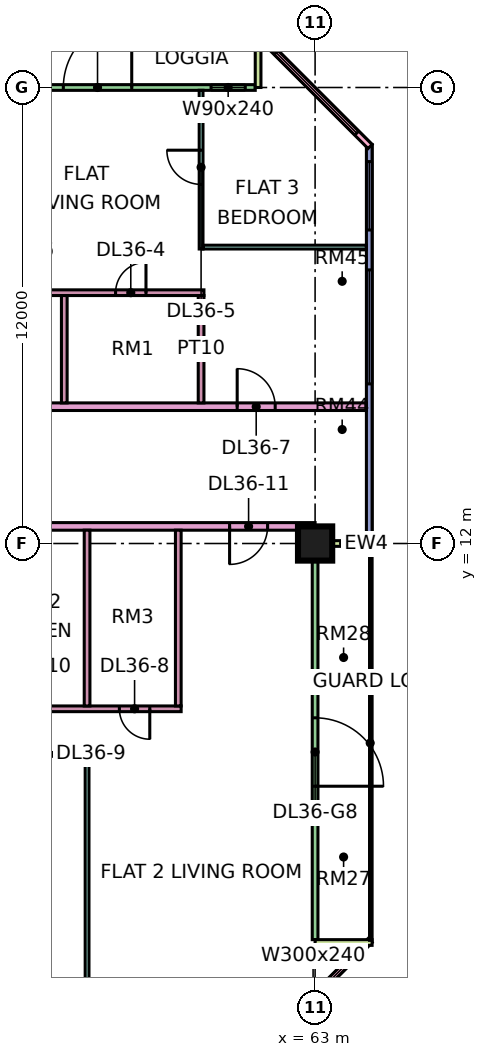
"""IFC4 building model, lengths in metres.
Left out: names, types, materials, properties, quantities, classifications, styles, units other than length and angle.
Written with IfcOpenShell. Run it as: python <this file> out.ifc"""

import sys

from ifc_helpers import new_model, si_unit, direction, frame, frame_2d, origin, origin_2d, place, context, subcontext, project, spatial, rectangle, extrude, element, fill, save


model = new_model("IFC4")
c1 = context("Model", 3, precision=1e-05, world=origin(), true_north=direction((0.0, 1.0)))
c2 = subcontext(c1, "Body", "Model", "MODEL_VIEW")
j1 = project(units=[si_unit("LENGTHUNIT", "METRE"), si_unit("PLANEANGLEUNIT", "RADIAN")], contexts=[c1])
p1 = place(None, origin())
s1 = spatial("IfcSite", under=j1, at=p1, CompositionType="ELEMENT")
p2 = place(p1, origin())
s2 = spatial("IfcBuilding", under=s1, at=p2, CompositionType="ELEMENT")
p3 = place(p2, frame((0.0, 0.0, 161.15)))
s3 = spatial("IfcBuildingStorey", under=s2, at=p3, CompositionType="ELEMENT", Elevation=161.15)
p4 = place(p3, frame((63.0, 12.0, 0.0), z_axis=(0.0, 0.0, 1.0), x_axis=(1.0, 0.0, 0.0)))
e1 = element("IfcColumn", 1, at=p4, inside=s3, PredefinedType="COLUMN", context=c2, shape_type="SweptSolid", body=[
    extrude(rectangle(XDim=0.9, YDim=0.9, at=origin_2d()), origin(), (0.0, 0.0, 1.0), 3.75),
])
p5 = place(p3, frame((61.425, 24.0, 0.0), z_axis=(0.0, 0.0, 1.0), x_axis=(-1.0, 0.0, 0.0)))
e2 = element("IfcWall", 2, at=p5, inside=s3, PredefinedType="SOLIDWALL", context=c2, shape_type="SweptSolid", body=[
    extrude(rectangle(XDim=13.35, YDim=0.15, at=frame_2d((6.675, 0.0))), origin(), (0.0, 0.0, 1.0), 3.35),
])
p6 = place(p5, frame((0.262, 0.0, 0.45)))
e3 = element("IfcOpeningElement", 3, at=p6, cuts=e2, PredefinedType="OPENING", context=c2, shape_type="SweptSolid", body=[
    extrude(rectangle(XDim=0.9, YDim=2.4, at=frame_2d((0.45, 1.2))), frame((0.0, 0.085, 0.0), z_axis=(0.0, -1.0, 0.0), x_axis=(1.0, 0.0, 0.0)), (0.0, 0.0, 1.0), 0.17),
])
p7 = place(p5, frame((3.25, 0.0, 0.0)))
e4 = element("IfcOpeningElement", 4, at=p7, cuts=e2, PredefinedType="OPENING", context=c2, shape_type="SweptSolid", body=[
    extrude(rectangle(XDim=1.8, YDim=2.4, at=frame_2d((0.9, 1.2))), frame((0.0, 0.085, 0.0), z_axis=(0.0, -1.0, 0.0), x_axis=(1.0, 0.0, 0.0)), (0.0, 0.0, 1.0), 0.17),
])
p8 = place(p5, frame((8.562, 0.0, 0.45)))
e5 = element("IfcOpeningElement", 5, at=p8, cuts=e2, PredefinedType="OPENING", context=c2, shape_type="SweptSolid", body=[
    extrude(rectangle(XDim=4.2, YDim=2.4, at=frame_2d((2.1, 1.2))), frame((0.0, 0.085, 0.0), z_axis=(0.0, -1.0, 0.0), x_axis=(1.0, 0.0, 0.0)), (0.0, 0.0, 1.0), 0.17),
])
p9 = place(p3, frame((61.5, 25.5, 0.0), z_axis=(0.0, 0.0, 1.0), x_axis=(0.0, -1.0, 0.0)))
e6 = element("IfcWall", 6, at=p9, inside=s3, PredefinedType="SOLIDWALL", context=c2, shape_type="SweptSolid", body=[
    extrude(rectangle(XDim=1.5, YDim=0.15, at=frame_2d((0.75, 0.0))), origin(), (0.0, 0.0, 1.0), 3.35),
])
p10 = place(p3, frame((61.447, -1.447, 0.0), z_axis=(0.0, 0.0, 1.0), x_axis=(0.707106781187, 0.707106781187, 0.0)))
e7 = element("IfcWall", 7, at=p10, inside=s3, PredefinedType="SOLIDWALL", context=c2, shape_type="SweptSolid", body=[
    extrude(rectangle(XDim=4.243, YDim=0.15, at=frame_2d((2.121, 0.0))), origin(), (0.0, 0.0, 1.0), 3.35),
])
p11 = place(p10, frame((0.621, 0.0, 0.45)))
e8 = element("IfcOpeningElement", 8, at=p11, cuts=e7, PredefinedType="OPENING", context=c2, shape_type="SweptSolid", body=[
    extrude(rectangle(XDim=3.0, YDim=2.4, at=frame_2d((1.5, 1.2))), frame((0.0, 0.085, 0.0), z_axis=(0.0, -1.0, 0.0), x_axis=(1.0, 0.0, 0.0)), (0.0, 0.0, 1.0), 0.17),
])
p12 = place(p3, frame((63.0, 1.575, 0.0), z_axis=(0.0, 0.0, 1.0), x_axis=(0.0, 1.0, 0.0)))
e9 = element("IfcWall", 9, at=p12, inside=s3, PredefinedType="SOLIDWALL", context=c2, shape_type="SweptSolid", body=[
    extrude(rectangle(XDim=10.35, YDim=0.15, at=frame_2d((5.175, 0.0))), origin(), (0.0, 0.0, 1.0), 3.35),
])
p13 = place(p12, frame((4.038, 0.0, 0.0)))
e10 = element("IfcOpeningElement", 10, at=p13, cuts=e9, PredefinedType="OPENING", context=c2, shape_type="SweptSolid", body=[
    extrude(rectangle(XDim=1.8, YDim=2.4, at=frame_2d((0.9, 1.2))), frame((0.0, 0.085, 0.0), z_axis=(0.0, -1.0, 0.0), x_axis=(1.0, 0.0, 0.0)), (0.0, 0.0, 1.0), 0.17),
])
for number, where, z_axis, x_axis in (
    (11, (64.5, 1.5, 0.0), (0.0, 0.0, 1.0), (-1.0, 0.0, 0.0)),
    (12, (64.5, 12.0, 0.0), (0.0, 0.0, 1.0), (-1.0, 0.0, 0.0)),
):
    element("IfcWall", number, at=place(p3, frame(where, z_axis=z_axis, x_axis=x_axis)), inside=s3, PredefinedType="SOLIDWALL", context=c2, shape_type="SweptSolid", body=[
        extrude(rectangle(XDim=1.5, YDim=0.15, at=frame_2d((0.75, 0.0))), origin(), (0.0, 0.0, 1.0), 3.35),
    ])
p14 = place(p3, frame((64.425, 12.075, 0.0), z_axis=(0.0, 0.0, 1.0), x_axis=(0.0, 1.0, 0.0)))
e13 = element("IfcWall", 13, at=p14, inside=s3, PredefinedType="SOLIDWALL", context=c2, shape_type="SweptSolid", body=[
    extrude(rectangle(XDim=10.425, YDim=0.15, at=frame_2d((5.212, 0.0))), origin(), (0.0, 0.0, 1.0), 3.35),
])
p15 = place(p14, frame((4.125, 0.0, 0.45)))
e14 = element("IfcOpeningElement", 14, at=p15, cuts=e13, PredefinedType="OPENING", context=c2, shape_type="SweptSolid", body=[
    extrude(rectangle(XDim=3.0, YDim=2.4, at=frame_2d((1.5, 1.2))), frame((0.0, 0.085, 0.0), z_axis=(0.0, -1.0, 0.0), x_axis=(1.0, 0.0, 0.0)), (0.0, 0.0, 1.0), 0.17),
])
p16 = place(p14, frame((8.175, 0.0, 0.45)))
e15 = element("IfcOpeningElement", 15, at=p16, cuts=e13, PredefinedType="OPENING", context=c2, shape_type="SweptSolid", body=[
    extrude(rectangle(XDim=1.8, YDim=2.4, at=frame_2d((0.9, 1.2))), frame((0.0, 0.085, 0.0), z_axis=(0.0, -1.0, 0.0), x_axis=(1.0, 0.0, 0.0)), (0.0, 0.0, 1.0), 0.17),
])
p17 = place(p3, frame((64.447, 22.447, 0.0), z_axis=(0.0, 0.0, 1.0), x_axis=(-0.707106781187, 0.707106781187, 0.0)))
e16 = element("IfcWall", 16, at=p17, inside=s3, PredefinedType="SOLIDWALL", context=c2, shape_type="SweptSolid", body=[
    extrude(rectangle(XDim=4.243, YDim=0.15, at=frame_2d((2.121, 0.0))), origin(), (0.0, 0.0, 1.0), 3.35),
])
p18 = place(p17, frame((0.498, 0.0, 0.45)))
e17 = element("IfcOpeningElement", 17, at=p18, cuts=e16, PredefinedType="OPENING", context=c2, shape_type="SweptSolid", body=[
    extrude(rectangle(XDim=3.0, YDim=2.4, at=frame_2d((1.5, 1.2))), frame((0.0, 0.085, 0.0), z_axis=(0.0, -1.0, 0.0), x_axis=(1.0, 0.0, 0.0)), (0.0, 0.0, 1.0), 0.17),
])
p19 = place(p3, frame((40.65, 12.45, 0.0), z_axis=(0.0, 0.0, 1.0), x_axis=(1.0, 0.0, 0.0)))
e18 = element("IfcWall", 18, at=p19, inside=s3, PredefinedType="PARTITIONING", context=c2, shape_type="SweptSolid", body=[
    extrude(rectangle(XDim=22.35, YDim=0.2, at=frame_2d((11.175, 0.0))), origin(), (0.0, 0.0, 1.0), 3.35),
])
p20 = place(p19, frame((20.1, 0.0, 0.0)))
e19 = element("IfcOpeningElement", 19, at=p20, cuts=e18, PredefinedType="OPENING", context=c2, shape_type="SweptSolid", body=[
    extrude(rectangle(XDim=1.0, YDim=2.1, at=frame_2d((0.5, 1.05))), frame((0.0, 0.11, 0.0), z_axis=(0.0, -1.0, 0.0), x_axis=(1.0, 0.0, 0.0)), (0.0, 0.0, 1.0), 0.22),
])
p21 = place(p19, frame((1.05, 0.0, 0.0)))
e20 = element("IfcOpeningElement", 20, at=p21, cuts=e18, PredefinedType="OPENING", context=c2, shape_type="SweptSolid", body=[
    extrude(rectangle(XDim=1.0, YDim=2.1, at=frame_2d((0.5, 1.05))), frame((0.0, 0.11, 0.0), z_axis=(0.0, -1.0, 0.0), x_axis=(1.0, 0.0, 0.0)), (0.0, 0.0, 1.0), 0.22),
])
p22 = place(p3, frame((51.225, 15.6, 0.0), z_axis=(0.0, 0.0, 1.0), x_axis=(1.0, 0.0, 0.0)))
e21 = element("IfcWall", 21, at=p22, inside=s3, PredefinedType="PARTITIONING", context=c2, shape_type="SweptSolid", body=[
    extrude(rectangle(XDim=13.125, YDim=0.2, at=frame_2d((6.562, 0.0))), origin(), (0.0, 0.0, 1.0), 3.35),
])
p23 = place(p22, frame((9.725, 0.0, 0.0)))
e22 = element("IfcOpeningElement", 22, at=p23, cuts=e21, PredefinedType="OPENING", context=c2, shape_type="SweptSolid", body=[
    extrude(rectangle(XDim=1.0, YDim=2.1, at=frame_2d((0.5, 1.05))), frame((0.0, 0.11, 0.0), z_axis=(0.0, -1.0, 0.0), x_axis=(1.0, 0.0, 0.0)), (0.0, 0.0, 1.0), 0.22),
])
p24 = place(p22, frame((0.875, 0.0, 0.0)))
e23 = element("IfcOpeningElement", 23, at=p24, cuts=e21, PredefinedType="OPENING", context=c2, shape_type="SweptSolid", body=[
    extrude(rectangle(XDim=1.0, YDim=2.1, at=frame_2d((0.5, 1.05))), frame((0.0, 0.11, 0.0), z_axis=(0.0, -1.0, 0.0), x_axis=(1.0, 0.0, 0.0)), (0.0, 0.0, 1.0), 0.22),
])
p25 = place(p3, frame((54.1, 6.45, 0.0), z_axis=(0.0, 0.0, 1.0), x_axis=(1.0, 0.0, 0.0)))
e24 = element("IfcWall", 24, at=p25, inside=s3, PredefinedType="PARTITIONING", context=c2, shape_type="SweptSolid", body=[
    extrude(rectangle(XDim=2.85, YDim=0.1, at=frame_2d((1.425, 0.0))), origin(), (0.0, 0.0, 1.0), 3.35),
])
p26 = place(p25, frame((0.95, 0.0, 0.0)))
e25 = element("IfcOpeningElement", 25, at=p26, cuts=e24, PredefinedType="OPENING", context=c2, shape_type="SweptSolid", body=[
    extrude(rectangle(XDim=0.9, YDim=2.1, at=frame_2d((0.45, 1.05))), frame((0.0, 0.06, 0.0), z_axis=(0.0, -1.0, 0.0), x_axis=(1.0, 0.0, 0.0)), (0.0, 0.0, 1.0), 0.12),
])
p27 = place(p3, frame((54.1, 7.65, 0.0), z_axis=(0.0, 0.0, 1.0), x_axis=(1.0, 0.0, 0.0)))
e26 = element("IfcWall", 26, at=p27, inside=s3, PredefinedType="PARTITIONING", context=c2, shape_type="SweptSolid", body=[
    extrude(rectangle(XDim=5.375, YDim=0.15, at=frame_2d((2.688, 0.0))), origin(), (0.0, 0.0, 1.0), 3.35),
])
p28 = place(p27, frame((3.75, 0.0, 0.0)))
e27 = element("IfcOpeningElement", 27, at=p28, cuts=e26, PredefinedType="OPENING", context=c2, shape_type="SweptSolid", body=[
    extrude(rectangle(XDim=0.8, YDim=2.1, at=frame_2d((0.4, 1.05))), frame((0.0, 0.085, 0.0), z_axis=(0.0, -1.0, 0.0), x_axis=(1.0, 0.0, 0.0)), (0.0, 0.0, 1.0), 0.17),
])
p29 = place(p27, frame((0.95, 0.0, 0.0)))
e28 = element("IfcOpeningElement", 28, at=p29, cuts=e26, PredefinedType="OPENING", context=c2, shape_type="SweptSolid", body=[
    extrude(rectangle(XDim=0.9, YDim=2.1, at=frame_2d((0.45, 1.05))), frame((0.0, 0.085, 0.0), z_axis=(0.0, -1.0, 0.0), x_axis=(1.0, 0.0, 0.0)), (0.0, 0.0, 1.0), 0.17),
])
p30 = place(p3, frame((54.1, 18.6, 0.0), z_axis=(0.0, 0.0, 1.0), x_axis=(1.0, 0.0, 0.0)))
e29 = element("IfcWall", 29, at=p30, inside=s3, PredefinedType="PARTITIONING", context=c2, shape_type="SweptSolid", body=[
    extrude(rectangle(XDim=5.975, YDim=0.15, at=frame_2d((2.987, 0.0))), origin(), (0.0, 0.0, 1.0), 3.35),
])
p31 = place(p30, frame((3.65, 0.0, 0.0)))
e30 = element("IfcOpeningElement", 30, at=p31, cuts=e29, PredefinedType="OPENING", context=c2, shape_type="SweptSolid", body=[
    extrude(rectangle(XDim=0.8, YDim=2.1, at=frame_2d((0.4, 1.05))), frame((0.0, 0.085, 0.0), z_axis=(0.0, -1.0, 0.0), x_axis=(1.0, 0.0, 0.0)), (0.0, 0.0, 1.0), 0.17),
])
p32 = place(p30, frame((0.65, 0.0, 0.0)))
e31 = element("IfcOpeningElement", 31, at=p32, cuts=e29, PredefinedType="OPENING", context=c2, shape_type="SweptSolid", body=[
    extrude(rectangle(XDim=0.9, YDim=2.1, at=frame_2d((0.45, 1.05))), frame((0.0, 0.085, 0.0), z_axis=(0.0, -1.0, 0.0), x_axis=(1.0, 0.0, 0.0)), (0.0, 0.0, 1.0), 0.17),
])
p33 = place(p3, frame((56.4, 15.7, 0.0), z_axis=(0.0, 0.0, 1.0), x_axis=(0.0, 1.0, 0.0)))
e32 = element("IfcWall", 32, at=p33, inside=s3, PredefinedType="PARTITIONING", context=c2, shape_type="SweptSolid", body=[
    extrude(rectangle(XDim=2.825, YDim=0.15, at=frame_2d((1.413, 0.0))), origin(), (0.0, 0.0, 1.0), 3.35),
])
p34 = place(p3, frame((57.0, 0.074, 0.0), z_axis=(0.0, 0.0, 1.0), x_axis=(0.0, 1.0, 0.0)))
e33 = element("IfcWall", 33, at=p34, inside=s3, PredefinedType="PARTITIONING", context=c2, shape_type="SweptSolid", body=[
    extrude(rectangle(XDim=6.426, YDim=0.1, at=frame_2d((3.213, 0.0))), origin(), (0.0, 0.0, 1.0), 3.35),
])
for number, where, z_axis, x_axis in (
    (34, (57.0, 7.725, 0.0), (0.0, 0.0, 1.0), (0.0, 1.0, 0.0)),
    (35, (59.4, 7.725, 0.0), (0.0, 0.0, 1.0), (0.0, 1.0, 0.0)),
):
    element("IfcWall", number, at=place(p3, frame(where, z_axis=z_axis, x_axis=x_axis)), inside=s3, PredefinedType="PARTITIONING", context=c2, shape_type="SweptSolid", body=[
        extrude(rectangle(XDim=4.625, YDim=0.15, at=frame_2d((2.312, 0.0))), origin(), (0.0, 0.0, 1.0), 3.35),
    ])
p35 = place(p3, frame((60.0, 15.7, 0.0), z_axis=(0.0, 0.0, 1.0), x_axis=(0.0, 1.0, 0.0)))
e36 = element("IfcWall", 36, at=p35, inside=s3, PredefinedType="PARTITIONING", context=c2, shape_type="SweptSolid", body=[
    extrude(rectangle(XDim=2.825, YDim=0.15, at=frame_2d((1.413, 0.0))), origin(), (0.0, 0.0, 1.0), 3.35),
])
p36 = place(p3, frame((60.0, 19.75, 0.0), z_axis=(0.0, 0.0, 1.0), x_axis=(0.0, 1.0, 0.0)))
e37 = element("IfcWall", 37, at=p36, inside=s3, PredefinedType="PARTITIONING", context=c2, shape_type="SweptSolid", body=[
    extrude(rectangle(XDim=4.176, YDim=0.1, at=frame_2d((2.088, 0.0))), origin(), (0.0, 0.0, 1.0), 3.35),
])
p37 = place(p36, frame((1.7, 0.0, 0.0)))
e38 = element("IfcOpeningElement", 38, at=p37, cuts=e37, PredefinedType="OPENING", context=c2, shape_type="SweptSolid", body=[
    extrude(rectangle(XDim=0.9, YDim=2.1, at=frame_2d((0.45, 1.05))), frame((0.0, 0.06, 0.0), z_axis=(0.0, -1.0, 0.0), x_axis=(1.0, 0.0, 0.0)), (0.0, 0.0, 1.0), 0.12),
])
p38 = place(p3, frame((60.05, 19.8, 0.0), z_axis=(0.0, 0.0, 1.0), x_axis=(1.0, 0.0, 0.0)))
e39 = element("IfcWall", 39, at=p38, inside=s3, PredefinedType="PARTITIONING", context=c2, shape_type="SweptSolid", body=[
    extrude(rectangle(XDim=4.3, YDim=0.1, at=frame_2d((2.15, 0.0))), origin(), (0.0, 0.0, 1.0), 3.35),
])
p39 = place(p6, origin())
e40 = element("IfcWindow", 40, at=p39, inside=s3, PartitioningType="SINGLE_PANEL", PredefinedType="WINDOW", context=c2, shape_type="SweptSolid", body=[
    extrude(rectangle(XDim=0.9, YDim=2.4, at=frame_2d((0.45, 1.2))), frame((0.0, 0.03, 0.0), z_axis=(0.0, -1.0, 0.0), x_axis=(1.0, 0.0, 0.0)), (0.0, 0.0, 1.0), 0.06),
])
fill(e3, e40)
p40 = place(p7, frame((1.8, 0.0, 0.0), z_axis=(0.0, 0.0, 1.0), x_axis=(-1.0, 0.0, 0.0)))
e41 = element("IfcDoor", 41, at=p40, inside=s3, OperationType="DOUBLE_DOOR_SINGLE_SWING", PredefinedType="DOOR", context=c2, shape_type="SweptSolid", body=[
    extrude(rectangle(XDim=1.8, YDim=2.4, at=frame_2d((0.9, 1.2))), frame((0.0, 0.025, 0.0), z_axis=(0.0, -1.0, 0.0), x_axis=(1.0, 0.0, 0.0)), (0.0, 0.0, 1.0), 0.05),
])
fill(e4, e41)
p41 = place(p11, origin())
e42 = element("IfcWindow", 42, at=p41, inside=s3, PartitioningType="SINGLE_PANEL", PredefinedType="WINDOW", context=c2, shape_type="SweptSolid", body=[
    extrude(rectangle(XDim=3.0, YDim=2.4, at=frame_2d((1.5, 1.2))), frame((0.0, 0.03, 0.0), z_axis=(0.0, -1.0, 0.0), x_axis=(1.0, 0.0, 0.0)), (0.0, 0.0, 1.0), 0.06),
])
fill(e8, e42)
p42 = place(p13, frame((1.8, 0.0, 0.0), z_axis=(0.0, 0.0, 1.0), x_axis=(-1.0, 0.0, 0.0)))
e43 = element("IfcDoor", 43, at=p42, inside=s3, OperationType="DOUBLE_DOOR_SINGLE_SWING", PredefinedType="DOOR", context=c2, shape_type="SweptSolid", body=[
    extrude(rectangle(XDim=1.8, YDim=2.4, at=frame_2d((0.9, 1.2))), frame((0.0, 0.025, 0.0), z_axis=(0.0, -1.0, 0.0), x_axis=(1.0, 0.0, 0.0)), (0.0, 0.0, 1.0), 0.05),
])
fill(e10, e43)
p43 = place(p15, origin())
e44 = element("IfcWindow", 44, at=p43, inside=s3, PartitioningType="SINGLE_PANEL", PredefinedType="WINDOW", context=c2, shape_type="SweptSolid", body=[
    extrude(rectangle(XDim=3.0, YDim=2.4, at=frame_2d((1.5, 1.2))), frame((0.0, 0.03, 0.0), z_axis=(0.0, -1.0, 0.0), x_axis=(1.0, 0.0, 0.0)), (0.0, 0.0, 1.0), 0.06),
])
fill(e14, e44)
p44 = place(p16, origin())
e45 = element("IfcWindow", 45, at=p44, inside=s3, PartitioningType="SINGLE_PANEL", PredefinedType="WINDOW", context=c2, shape_type="SweptSolid", body=[
    extrude(rectangle(XDim=1.8, YDim=2.4, at=frame_2d((0.9, 1.2))), frame((0.0, 0.03, 0.0), z_axis=(0.0, -1.0, 0.0), x_axis=(1.0, 0.0, 0.0)), (0.0, 0.0, 1.0), 0.06),
])
fill(e15, e45)
p45 = place(p18, origin())
e46 = element("IfcWindow", 46, at=p45, inside=s3, PartitioningType="SINGLE_PANEL", PredefinedType="WINDOW", context=c2, shape_type="SweptSolid", body=[
    extrude(rectangle(XDim=3.0, YDim=2.4, at=frame_2d((1.5, 1.2))), frame((0.0, 0.03, 0.0), z_axis=(0.0, -1.0, 0.0), x_axis=(1.0, 0.0, 0.0)), (0.0, 0.0, 1.0), 0.06),
])
fill(e17, e46)
p46 = place(p31, frame((0.8, 0.0, 0.0), z_axis=(0.0, 0.0, 1.0), x_axis=(-1.0, 0.0, 0.0)))
e47 = element("IfcDoor", 47, at=p46, inside=s3, OperationType="SINGLE_SWING_RIGHT", PredefinedType="DOOR", context=c2, shape_type="SweptSolid", body=[
    extrude(rectangle(XDim=0.8, YDim=2.1, at=frame_2d((0.4, 1.05))), frame((0.0, 0.025, 0.0), z_axis=(0.0, -1.0, 0.0), x_axis=(1.0, 0.0, 0.0)), (0.0, 0.0, 1.0), 0.05),
])
fill(e30, e47)
p47 = place(p37, frame((0.9, 0.0, 0.0), z_axis=(0.0, 0.0, 1.0), x_axis=(-1.0, 0.0, 0.0)))
e48 = element("IfcDoor", 48, at=p47, inside=s3, OperationType="SINGLE_SWING_RIGHT", PredefinedType="DOOR", context=c2, shape_type="SweptSolid", body=[
    extrude(rectangle(XDim=0.9, YDim=2.1, at=frame_2d((0.45, 1.05))), frame((0.0, 0.025, 0.0), z_axis=(0.0, -1.0, 0.0), x_axis=(1.0, 0.0, 0.0)), (0.0, 0.0, 1.0), 0.05),
])
fill(e38, e48)
p48 = place(p23, origin())
e49 = element("IfcDoor", 49, at=p48, inside=s3, OperationType="SINGLE_SWING_LEFT", PredefinedType="DOOR", context=c2, shape_type="SweptSolid", body=[
    extrude(rectangle(XDim=1.0, YDim=2.1, at=frame_2d((0.5, 1.05))), frame((0.0, 0.025, 0.0), z_axis=(0.0, -1.0, 0.0), x_axis=(1.0, 0.0, 0.0)), (0.0, 0.0, 1.0), 0.05),
])
fill(e22, e49)
p49 = place(p28, origin())
e50 = element("IfcDoor", 50, at=p49, inside=s3, OperationType="SINGLE_SWING_RIGHT", PredefinedType="DOOR", context=c2, shape_type="SweptSolid", body=[
    extrude(rectangle(XDim=0.8, YDim=2.1, at=frame_2d((0.4, 1.05))), frame((0.0, 0.025, 0.0), z_axis=(0.0, -1.0, 0.0), x_axis=(1.0, 0.0, 0.0)), (0.0, 0.0, 1.0), 0.05),
])
fill(e27, e50)
p50 = place(p20, frame((1.0, 0.0, 0.0), z_axis=(0.0, 0.0, 1.0), x_axis=(-1.0, 0.0, 0.0)))
e51 = element("IfcDoor", 51, at=p50, inside=s3, OperationType="SINGLE_SWING_LEFT", PredefinedType="DOOR", context=c2, shape_type="SweptSolid", body=[
    extrude(rectangle(XDim=1.0, YDim=2.1, at=frame_2d((0.5, 1.05))), frame((0.0, 0.025, 0.0), z_axis=(0.0, -1.0, 0.0), x_axis=(1.0, 0.0, 0.0)), (0.0, 0.0, 1.0), 0.05),
])
fill(e19, e51)
save(model, sys.argv[1])
